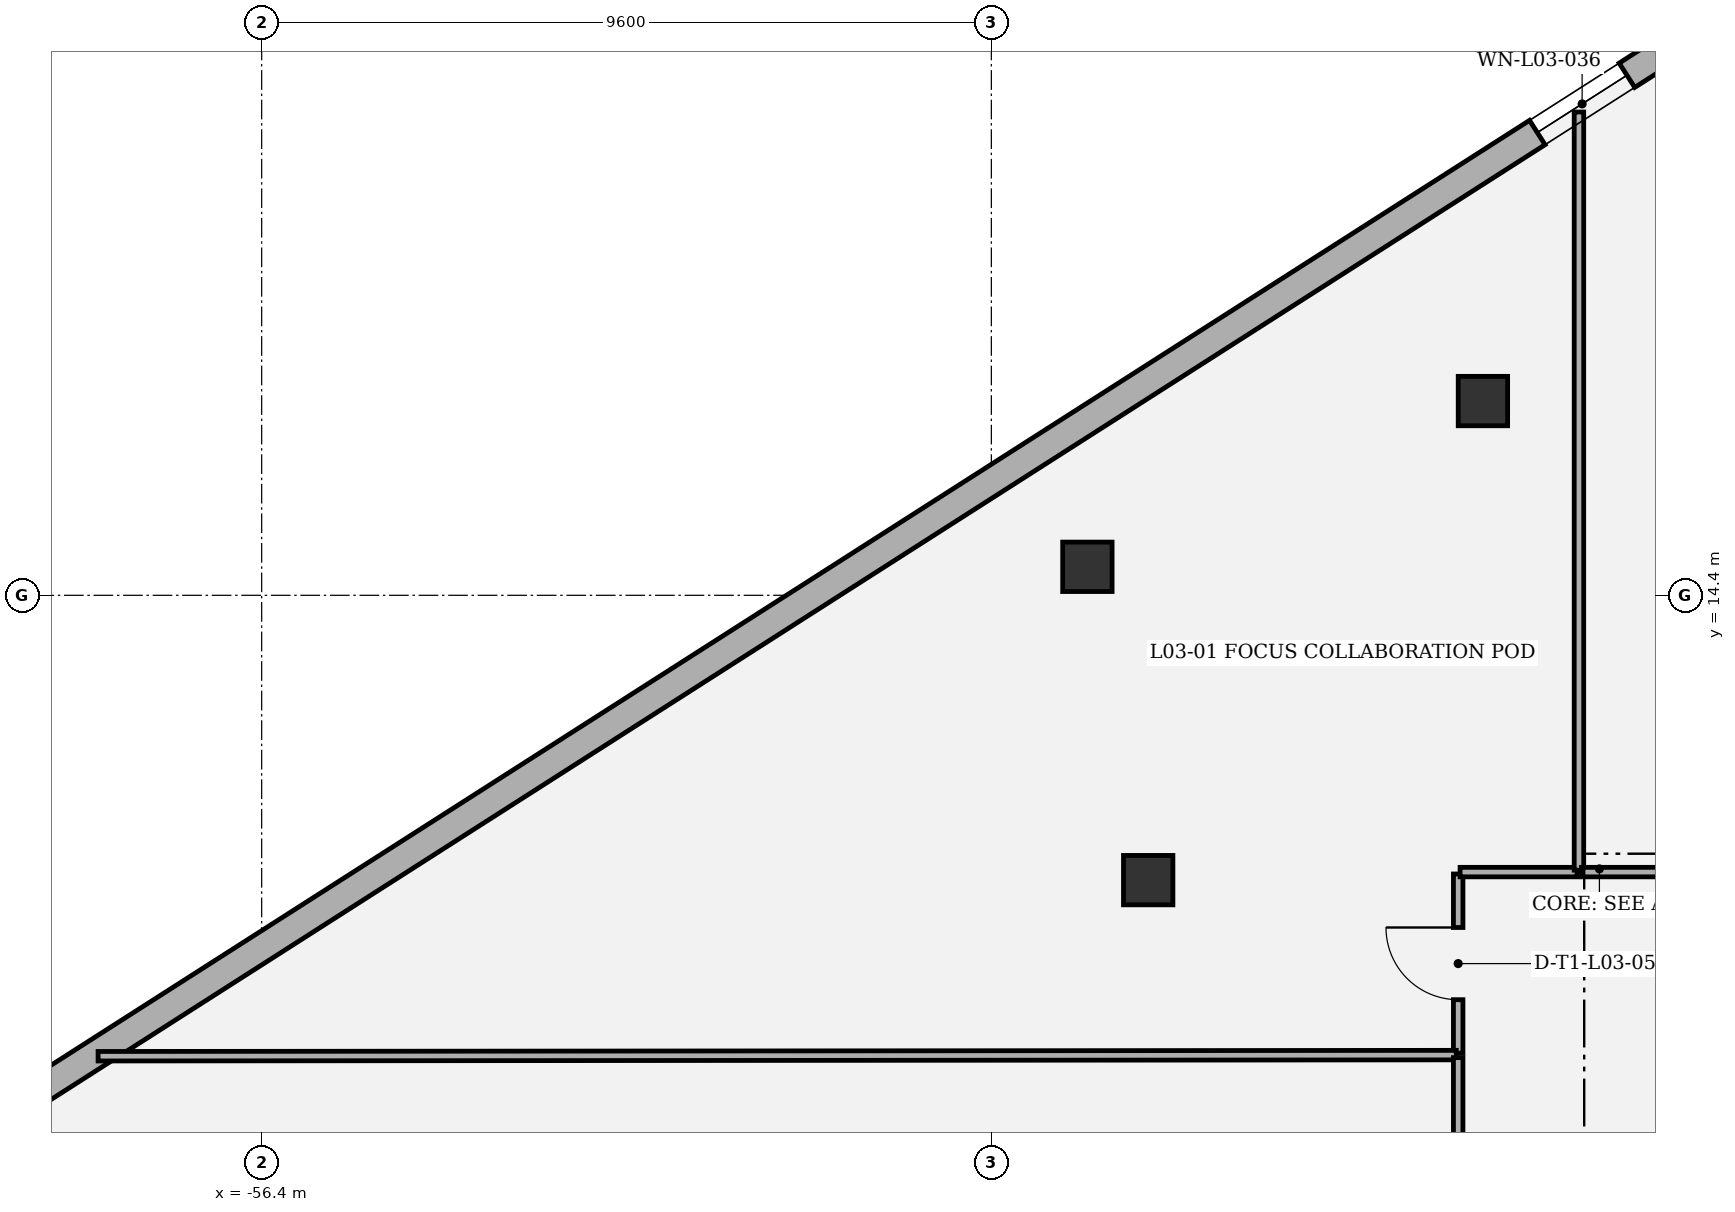
"""IFC4 building model, lengths in metres.
Left out: names, types, materials, properties, quantities, classifications, styles, units other than length and angle.
Written with IfcOpenShell. Run it as: python <this file> out.ifc"""

import sys

from ifc_helpers import new_model, si_unit, direction, frame, frame_2d, origin, origin_2d, place, context, subcontext, project, spatial, rectangle, extrude, element, fill, save


model = new_model("IFC4")
c1 = context("Model", 3, precision=1e-05, world=origin(), true_north=direction((0.0, 1.0)))
c2 = subcontext(c1, "Body", "Model", "MODEL_VIEW")
j1 = project(units=[si_unit("LENGTHUNIT", "METRE"), si_unit("PLANEANGLEUNIT", "RADIAN")], contexts=[c1])
p1 = place(None, origin())
s1 = spatial("IfcSite", under=j1, at=p1, CompositionType="ELEMENT")
p2 = place(p1, origin())
s2 = spatial("IfcBuilding", under=s1, at=p2, CompositionType="ELEMENT")
p3 = place(p2, frame((0.0, 0.0, 17.0)))
s3 = spatial("IfcBuildingStorey", under=s2, at=p3, CompositionType="ELEMENT", Elevation=17.0)
for number, where, z_axis, x_axis in (
    (1, (-45.536, 14.775, 0.0), (0.0, 0.0, 1.0), (1.0, 0.0, 0.0)),
    (2, (-40.333, 16.956, 0.0), (0.0, 0.0, 1.0), (1.0, 0.0, 0.0)),
    (3, (-44.736, 10.652, 0.0), (0.0, 0.0, 1.0), (1.0, 0.0, 0.0)),
):
    element("IfcColumn", number, at=place(p3, frame(where, z_axis=z_axis, x_axis=x_axis)), inside=s3, PredefinedType="COLUMN", context=c2, shape_type="SweptSolid", body=[
        extrude(rectangle(XDim=0.65, YDim=0.65, at=origin_2d()), origin(), (0.0, 0.0, 1.0), 5.0),
    ])
p4 = place(p3, frame((-64.419, 4.637, 0.0), z_axis=(0.0, 0.0, 1.0), x_axis=(0.842602364841, 0.538536214905, 0.0)))
e4 = element("IfcWall", 4, at=p4, inside=s3, PredefinedType="SOLIDWALL", context=c2, shape_type="SweptSolid", body=[
    extrude(rectangle(XDim=60.27, YDim=0.38, at=frame_2d((30.135, 0.0))), origin(), (0.0, 0.0, 1.0), 4.74),
])
p5 = place(p4, frame((29.435, 0.0, 0.8)))
e5 = element("IfcOpeningElement", 5, at=p5, cuts=e4, PredefinedType="OPENING", context=c2, shape_type="SweptSolid", body=[
    extrude(rectangle(XDim=1.4, YDim=1.5, at=frame_2d((0.7, 0.75))), frame((0.0, 0.2, 0.0), z_axis=(0.0, -1.0, 0.0), x_axis=(1.0, 0.0, 0.0)), (0.0, 0.0, 1.0), 0.4),
])
p6 = place(p3, frame((-40.658, 8.375, 0.0), z_axis=(0.0, 0.0, 1.0), x_axis=(0.0, 1.0, 0.0)))
e6 = element("IfcWall", 6, at=p6, inside=s3, PredefinedType="PARTITIONING", context=c2, shape_type="SweptSolid", body=[
    extrude(rectangle(XDim=2.358, YDim=0.125, at=frame_2d((1.179, 0.0))), origin(), (0.0, 0.0, 1.0), 4.74),
])
p7 = place(p6, frame((0.704, 0.0, 0.0)))
e7 = element("IfcOpeningElement", 7, at=p7, cuts=e6, PredefinedType="OPENING", context=c2, shape_type="SweptSolid", body=[
    extrude(rectangle(XDim=0.95, YDim=2.15, at=frame_2d((0.475, 1.075))), frame((0.0, 0.073, 0.0), z_axis=(0.0, -1.0, 0.0), x_axis=(1.0, 0.0, 0.0)), (0.0, 0.0, 1.0), 0.145),
])
p8 = place(p3, frame((-40.633, 10.758, 0.0), z_axis=(0.0, 0.0, 1.0), x_axis=(1.0, 0.0, 0.0)))
e8 = element("IfcWall", 8, at=p8, inside=s3, PredefinedType="PARTITIONING", context=c2, shape_type="SweptSolid", body=[
    extrude(rectangle(XDim=1.539, YDim=0.125, at=frame_2d((0.77, 0.0))), origin(), (0.0, 0.0, 1.0), 4.74),
])
p9 = place(p3, frame((-39.069, 10.783, 0.0), z_axis=(0.0, 0.0, 1.0), x_axis=(0.0, 1.0, 0.0)))
e9 = element("IfcWall", 9, at=p9, inside=s3, PredefinedType="PARTITIONING", context=c2, shape_type="SweptSolid", body=[
    extrude(rectangle(XDim=9.976, YDim=0.125, at=frame_2d((4.988, 0.0))), origin(), (0.0, 0.0, 1.0), 4.74),
])
p10 = place(p3, frame((-58.552, 8.335, 0.0), z_axis=(0.0, 0.0, 1.0), x_axis=(0.999999663996, 0.000819761447, 0.0)))
e10 = element("IfcWall", 10, at=p10, inside=s3, PredefinedType="PARTITIONING", context=c2, shape_type="SweptSolid", body=[
    extrude(rectangle(XDim=17.869, YDim=0.125, at=frame_2d((8.935, 0.0))), origin(), (0.0, 0.0, 1.0), 3.71),
])
p11 = place(p3, frame((-39.036, 10.758, 0.0), z_axis=(0.0, 0.0, 1.0), x_axis=(1.0, 0.0, 0.0)))
e11 = element("IfcWall", 11, at=p11, inside=s3, PredefinedType="PARTITIONING", context=c2, shape_type="SweptSolid", body=[
    extrude(rectangle(XDim=10.03, YDim=0.125, at=frame_2d((5.015, 0.0))), origin(), (0.0, 0.0, 1.0), 4.253),
])
p12 = place(p11, frame((4.54, 0.0, 0.0)))
e12 = element("IfcOpeningElement", 12, at=p12, cuts=e11, PredefinedType="OPENING", context=c2, shape_type="SweptSolid", body=[
    extrude(rectangle(XDim=0.95, YDim=2.15, at=frame_2d((0.475, 1.075))), frame((0.0, 0.073, 0.0), z_axis=(0.0, -1.0, 0.0), x_axis=(1.0, 0.0, 0.0)), (0.0, 0.0, 1.0), 0.145),
])
p13 = place(p3, frame((-40.658, -8.517, 0.0), z_axis=(0.0, 0.0, 1.0), x_axis=(0.0, 1.0, 0.0)))
e13 = element("IfcWall", 13, at=p13, inside=s3, PredefinedType="PARTITIONING", context=c2, shape_type="SweptSolid", body=[
    extrude(rectangle(XDim=16.834, YDim=0.125, at=frame_2d((8.417, 0.0))), origin(), (0.0, 0.0, 1.0), 4.74),
])
p14 = place(p13, frame((7.942, 0.0, 0.0)))
e14 = element("IfcOpeningElement", 14, at=p14, cuts=e13, PredefinedType="OPENING", context=c2, shape_type="SweptSolid", body=[
    extrude(rectangle(XDim=0.95, YDim=2.15, at=frame_2d((0.475, 1.075))), frame((0.0, 0.073, 0.0), z_axis=(0.0, -1.0, 0.0), x_axis=(1.0, 0.0, 0.0)), (0.0, 0.0, 1.0), 0.145),
])
p15 = place(p5, origin())
e15 = element("IfcWindow", 15, at=p15, inside=s3, PartitioningType="SINGLE_PANEL", PredefinedType="WINDOW", context=c2, shape_type="SweptSolid", body=[
    extrude(rectangle(XDim=1.4, YDim=1.5, at=frame_2d((0.7, 0.75))), frame((0.0, 0.03, 0.0), z_axis=(0.0, -1.0, 0.0), x_axis=(1.0, 0.0, 0.0)), (0.0, 0.0, 1.0), 0.06),
])
fill(e5, e15)
p16 = place(p7, origin())
e16 = element("IfcDoor", 16, at=p16, inside=s3, OperationType="SINGLE_SWING_RIGHT", PredefinedType="DOOR", context=c2, shape_type="SweptSolid", body=[
    extrude(rectangle(XDim=0.95, YDim=2.15, at=frame_2d((0.475, 1.075))), frame((0.0, 0.025, 0.0), z_axis=(0.0, -1.0, 0.0), x_axis=(1.0, 0.0, 0.0)), (0.0, 0.0, 1.0), 0.05),
])
fill(e7, e16)
save(model, sys.argv[1])
